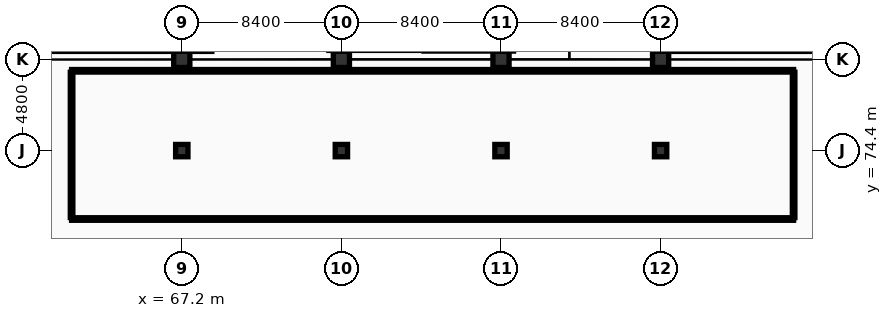
"""IFC4 building model, lengths in metres.
Left out: names, types, materials, properties, quantities, classifications, styles, units other than length and angle.
Written with IfcOpenShell. Run it as: python <this file> out.ifc"""

import sys

from ifc_helpers import new_model, si_unit, direction, frame, frame_2d, origin, origin_2d, place, context, subcontext, project, spatial, rectangle, extrude, element, fill, save


model = new_model("IFC4")
c1 = context("Model", 3, precision=1e-05, world=origin(), true_north=direction((0.0, 1.0)))
c2 = subcontext(c1, "Body", "Model", "MODEL_VIEW")
j1 = project(units=[si_unit("LENGTHUNIT", "METRE"), si_unit("PLANEANGLEUNIT", "RADIAN")], contexts=[c1])
p1 = place(None, origin())
s1 = spatial("IfcSite", under=j1, at=p1, CompositionType="ELEMENT")
p2 = place(p1, origin())
s2 = spatial("IfcBuilding", under=s1, at=p2, CompositionType="ELEMENT")
p3 = place(p2, origin())
s3 = spatial("IfcBuildingStorey", under=s2, at=p3, CompositionType="ELEMENT", Elevation=0.0)
for number, where, z_axis, x_axis in (
    (1, (67.2, 79.2, 0.0), (0.0, 0.0, 1.0), (1.0, 0.0, 0.0)),
    (2, (75.6, 79.2, 0.0), (0.0, 0.0, 1.0), (1.0, 0.0, 0.0)),
    (3, (84.0, 79.2, 0.0), (0.0, 0.0, 1.0), (1.0, 0.0, 0.0)),
    (4, (92.4, 79.2, 0.0), (0.0, 0.0, 1.0), (1.0, 0.0, 0.0)),
):
    element("IfcColumn", number, at=place(p3, frame(where, z_axis=z_axis, x_axis=x_axis)), inside=s3, PredefinedType="COLUMN", context=c2, shape_type="SweptSolid", body=[
        extrude(rectangle(XDim=0.85, YDim=0.85, at=origin_2d()), origin(), (0.0, 0.0, 1.0), 5.4),
    ])
for number, where, z_axis, x_axis in (
    (5, (67.2, 74.4, 0.0), (0.0, 0.0, 1.0), (1.0, 0.0, 0.0)),
    (6, (75.6, 74.4, 0.0), (0.0, 0.0, 1.0), (1.0, 0.0, 0.0)),
    (7, (84.0, 74.4, 0.0), (0.0, 0.0, 1.0), (1.0, 0.0, 0.0)),
    (8, (92.4, 74.4, 0.0), (0.0, 0.0, 1.0), (1.0, 0.0, 0.0)),
):
    element("IfcColumn", number, at=place(p3, frame(where, z_axis=z_axis, x_axis=x_axis)), inside=s3, PredefinedType="COLUMN", context=c2, shape_type="SweptSolid", body=[
        extrude(rectangle(XDim=0.65, YDim=0.65, at=origin_2d()), origin(), (0.0, 0.0, 1.0), 5.4),
    ])
p4 = place(p3, frame((61.4, 78.6, 0.0), z_axis=(0.0, 0.0, 1.0), x_axis=(1.0, 0.0, 0.0)))
e9 = element("IfcWall", 9, at=p4, inside=s3, PredefinedType="PARTITIONING", context=c2, shape_type="SweptSolid", body=[
    extrude(rectangle(XDim=38.0, YDim=0.135, at=frame_2d((19.0, 0.0))), origin(), (0.0, 0.0, 1.0), 4.58),
])
p5 = place(p3, frame((99.4, 70.8, 0.0), z_axis=(0.0, 0.0, 1.0), x_axis=(-1.0, 0.0, 0.0)))
e10 = element("IfcWall", 10, at=p5, inside=s3, PredefinedType="PARTITIONING", context=c2, shape_type="SweptSolid", body=[
    extrude(rectangle(XDim=38.0, YDim=0.135, at=frame_2d((19.0, 0.0))), origin(), (0.0, 0.0, 1.0), 4.53),
])
p6 = place(p5, frame((2.167, 0.0, 0.0)))
e11 = element("IfcOpeningElement", 11, at=p6, cuts=e10, PredefinedType="OPENING", context=c2, shape_type="SweptSolid", body=[
    extrude(rectangle(XDim=0.95, YDim=2.15, at=frame_2d((0.475, 1.075))), frame((0.0, 0.077, 0.0), z_axis=(0.0, -1.0, 0.0), x_axis=(1.0, 0.0, 0.0)), (0.0, 0.0, 1.0), 0.155),
])
p7 = place(p3, frame((61.4, 70.877, 0.0), z_axis=(0.0, 0.0, 1.0), x_axis=(0.0, 1.0, 0.0)))
e12 = element("IfcWall", 12, at=p7, inside=s3, PredefinedType="PARTITIONING", context=c2, shape_type="SweptSolid", body=[
    extrude(rectangle(XDim=7.645, YDim=0.135, at=frame_2d((3.823, 0.0))), origin(), (0.0, 0.0, 1.0), 4.43),
])
p8 = place(p3, frame((99.4, 78.522, 0.0), z_axis=(0.0, 0.0, 1.0), x_axis=(0.0, -1.0, 0.0)))
e13 = element("IfcWall", 13, at=p8, inside=s3, PredefinedType="PARTITIONING", context=c2, shape_type="SweptSolid", body=[
    extrude(rectangle(XDim=7.645, YDim=0.135, at=frame_2d((3.823, 0.0))), origin(), (0.0, 0.0, 1.0), 4.33),
])
p9 = place(p6, origin())
e14 = element("IfcDoor", 14, at=p9, inside=s3, OperationType="SINGLE_SWING_LEFT", PredefinedType="DOOR", context=c2, shape_type="SweptSolid", body=[
    extrude(rectangle(XDim=0.95, YDim=2.15, at=frame_2d((0.475, 1.075))), frame((0.0, 0.025, 0.0), z_axis=(0.0, -1.0, 0.0), x_axis=(1.0, 0.0, 0.0)), (0.0, 0.0, 1.0), 0.05),
])
fill(e11, e14)
save(model, sys.argv[1])
